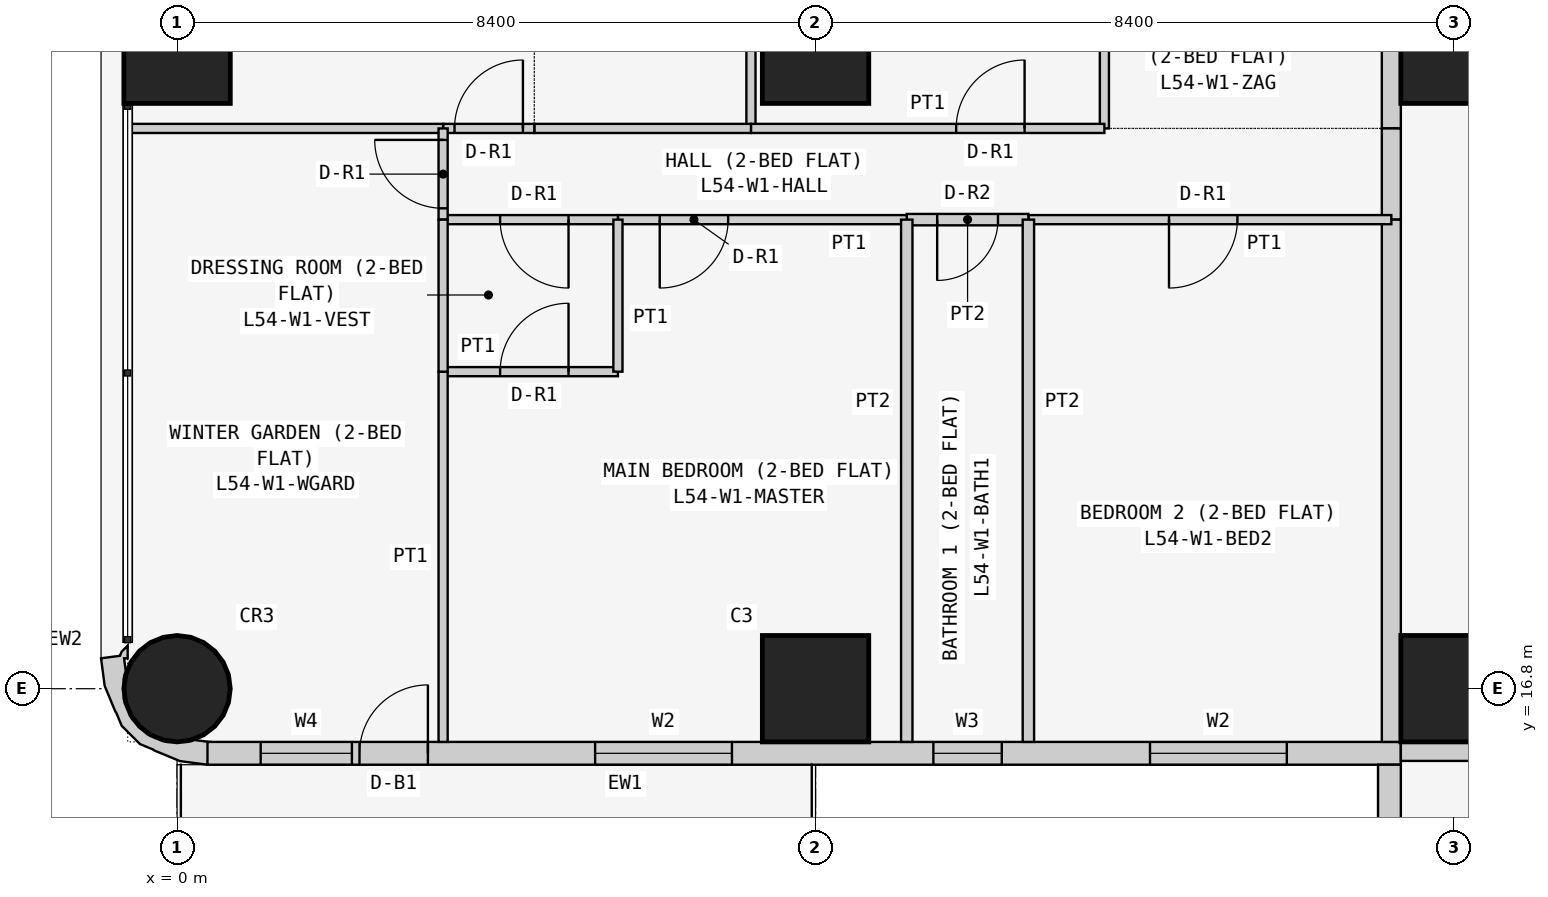
"""IFC4 building model, lengths in metres.
Left out: names, types, materials, properties, quantities, classifications, styles, units other than length and angle.
Written with IfcOpenShell. Run it as: python <this file> out.ifc"""

import sys

from ifc_helpers import new_model, si_unit, direction, frame, frame_2d, origin, origin_2d, place, context, subcontext, project, spatial, polyline, rectangle, circle, outline, extrude, element, fill, save


model = new_model("IFC4")
c1 = context("Model", 3, precision=1e-05, world=origin(), true_north=direction((0.0, 1.0)))
c2 = subcontext(c1, "Body", "Model", "MODEL_VIEW")
j1 = project(units=[si_unit("LENGTHUNIT", "METRE"), si_unit("PLANEANGLEUNIT", "RADIAN")], contexts=[c1])
p1 = place(None, origin())
s1 = spatial("IfcSite", under=j1, at=p1, CompositionType="ELEMENT")
p2 = place(p1, origin())
s2 = spatial("IfcBuilding", under=s1, at=p2, CompositionType="ELEMENT")
p3 = place(p2, frame((0.0, 0.0, 208.5)))
s3 = spatial("IfcBuildingStorey", under=s2, at=p3, CompositionType="ELEMENT", Elevation=208.5)
p4 = place(p3, frame((0.0, 16.8, 0.0), z_axis=(0.0, 0.0, 1.0), x_axis=(1.0, 0.0, 0.0)))
e1 = element("IfcColumn", 1, at=p4, inside=s3, PredefinedType="COLUMN", context=c2, shape_type="SweptSolid", body=[
    extrude(circle(Radius=0.7, at=origin_2d()), origin(), (0.0, 0.0, 1.0), 3.6),
])
for number, where, z_axis, x_axis in (
    (2, (0.0, 25.2, 0.0), (0.0, 0.0, 1.0), (1.0, 0.0, 0.0)),
    (3, (8.4, 16.8, 0.0), (0.0, 0.0, 1.0), (1.0, 0.0, 0.0)),
    (4, (8.4, 25.2, 0.0), (0.0, 0.0, 1.0), (1.0, 0.0, 0.0)),
    (5, (16.8, 16.8, 0.0), (0.0, 0.0, 1.0), (1.0, 0.0, 0.0)),
    (6, (16.8, 25.2, 0.0), (0.0, 0.0, 1.0), (1.0, 0.0, 0.0)),
):
    element("IfcColumn", number, at=place(p3, frame(where, z_axis=z_axis, x_axis=x_axis)), inside=s3, PredefinedType="COLUMN", context=c2, shape_type="SweptSolid", body=[
        extrude(rectangle(XDim=1.4, YDim=1.4, at=origin_2d()), origin(), (0.0, 0.0, 1.0), 3.6),
    ])
p5 = place(p3, frame((0.4, 15.95, 0.0), z_axis=(0.0, 0.0, 1.0), x_axis=(1.0, 0.0, 0.0)))
e7 = element("IfcWall", 7, at=p5, inside=s3, PredefinedType="SOLIDWALL", context=c2, shape_type="SweptSolid", body=[
    extrude(rectangle(XDim=15.7, YDim=0.3, at=frame_2d((7.85, 0.0))), origin(), (0.0, 0.0, 1.0), 3.45),
])
p6 = place(p5, frame((12.4, 0.0, 0.9)))
e8 = element("IfcOpeningElement", 8, at=p6, cuts=e7, PredefinedType="OPENING", context=c2, shape_type="SweptSolid", body=[
    extrude(rectangle(XDim=1.8, YDim=1.5, at=frame_2d((0.9, 0.75))), frame((0.0, 0.16, 0.0), z_axis=(0.0, -1.0, 0.0), x_axis=(1.0, 0.0, 0.0)), (0.0, 0.0, 1.0), 0.32),
])
p7 = place(p5, frame((9.55, 0.0, 1.5)))
e9 = element("IfcOpeningElement", 9, at=p7, cuts=e7, PredefinedType="OPENING", context=c2, shape_type="SweptSolid", body=[
    extrude(rectangle(XDim=0.9, YDim=0.7, at=frame_2d((0.45, 0.35))), frame((0.0, 0.16, 0.0), z_axis=(0.0, -1.0, 0.0), x_axis=(1.0, 0.0, 0.0)), (0.0, 0.0, 1.0), 0.32),
])
p8 = place(p5, frame((5.1, 0.0, 0.9)))
e10 = element("IfcOpeningElement", 10, at=p8, cuts=e7, PredefinedType="OPENING", context=c2, shape_type="SweptSolid", body=[
    extrude(rectangle(XDim=1.8, YDim=1.5, at=frame_2d((0.9, 0.75))), frame((0.0, 0.16, 0.0), z_axis=(0.0, -1.0, 0.0), x_axis=(1.0, 0.0, 0.0)), (0.0, 0.0, 1.0), 0.32),
])
p9 = place(p5, frame((2.0, 0.0, 0.0)))
e11 = element("IfcOpeningElement", 11, at=p9, cuts=e7, PredefinedType="OPENING", context=c2, shape_type="SweptSolid", body=[
    extrude(rectangle(XDim=0.9, YDim=2.4, at=frame_2d((0.45, 1.2))), frame((0.0, 0.16, 0.0), z_axis=(0.0, -1.0, 0.0), x_axis=(1.0, 0.0, 0.0)), (0.0, 0.0, 1.0), 0.32),
])
p10 = place(p5, frame((0.7, 0.0, 0.9)))
e12 = element("IfcOpeningElement", 12, at=p10, cuts=e7, PredefinedType="OPENING", context=c2, shape_type="SweptSolid", body=[
    extrude(rectangle(XDim=1.2, YDim=1.5, at=frame_2d((0.6, 0.75))), frame((0.0, 0.16, 0.0), z_axis=(0.0, -1.0, 0.0), x_axis=(1.0, 0.0, 0.0)), (0.0, 0.0, 1.0), 0.32),
])
p11 = place(p3, frame((15.95, 15.8, 0.0), z_axis=(0.0, 0.0, 1.0), x_axis=(0.0, -1.0, 0.0)))
e13 = element("IfcWall", 13, at=p11, inside=s3, PredefinedType="SOLIDWALL", context=c2, shape_type="SweptSolid", body=[
    extrude(rectangle(XDim=7.0, YDim=0.3, at=frame_2d((3.5, 0.0))), origin(), (0.0, 0.0, 1.0), 3.45),
])
p12 = place(p11, frame((1.5, 0.0, 0.9)))
e14 = element("IfcOpeningElement", 14, at=p12, cuts=e13, PredefinedType="OPENING", context=c2, shape_type="SweptSolid", body=[
    extrude(rectangle(XDim=2.4, YDim=1.5, at=frame_2d((1.2, 0.75))), frame((0.0, 0.16, 0.0), z_axis=(0.0, -1.0, 0.0), x_axis=(1.0, 0.0, 0.0)), (0.0, 0.0, 1.0), 0.32),
])
p13 = place(p11, frame((5.05, 0.0, 0.9)))
e15 = element("IfcOpeningElement", 15, at=p13, cuts=e13, PredefinedType="OPENING", context=c2, shape_type="SweptSolid", body=[
    extrude(rectangle(XDim=1.2, YDim=1.5, at=frame_2d((0.6, 0.75))), frame((0.0, 0.16, 0.0), z_axis=(0.0, -1.0, 0.0), x_axis=(1.0, 0.0, 0.0)), (0.0, 0.0, 1.0), 0.32),
])
p14 = place(p3, frame((-0.588, 17.312, 0.0), z_axis=(0.0, 0.0, 1.0), x_axis=(-0.898030234854, -0.439933741929, 0.0)))
e16 = element("IfcWall", 16, at=p14, inside=s3, PredefinedType="SOLIDWALL", context=c2, shape_type="SweptSolid", body=[
    extrude(outline(polyline([(-0.222, 1.793), (-0.39, 1.541), (-0.372, 1.532), (-0.195, 1.415), (-0.12, 1.41), (0.131, 1.287), (0.315, 1.078), (0.406, 0.814), (0.388, 0.536), (0.265, 0.285), (0.209, 0.236), (0.148, 0.053), (0.105, 0.074), (0.032, -0.076), (0.138, -0.039), (0.182, -0.0), (0.419, -0.08), (0.536, 0.266), (0.559, 0.631), (0.555, 0.651), (0.566, 0.836), (0.456, 1.159), (0.333, 1.298), (0.324, 1.316), (0.082, 1.591), (-0.222, 1.793)])), origin(), (0.0, 0.0, 1.0), 3.45),
])
p15 = place(p3, frame((22.971, 15.975, 0.0), z_axis=(0.0, 0.0, 1.0), x_axis=(-1.0, 0.0, 0.0)))
e17 = element("IfcWall", 17, at=p15, inside=s3, PredefinedType="PARTITIONING", context=c2, shape_type="SweptSolid", body=[
    extrude(rectangle(XDim=6.871, YDim=0.25, at=frame_2d((3.436, 0.0))), origin(), (0.0, 0.0, 1.0), 3.45),
])
p16 = place(p3, frame((15.975, 24.171, 0.0), z_axis=(0.0, 0.0, 1.0), x_axis=(0.0, 1.0, 0.0)))
e18 = element("IfcWall", 18, at=p16, inside=s3, PredefinedType="PARTITIONING", context=c2, shape_type="SweptSolid", body=[
    extrude(rectangle(XDim=5.229, YDim=0.25, at=frame_2d((2.615, 0.0))), origin(), (0.0, 0.0, 1.0), 3.45),
])
p17 = place(p16, frame((2.129, 0.0, 0.0)))
e19 = element("IfcOpeningElement", 19, at=p17, cuts=e18, PredefinedType="OPENING", context=c2, shape_type="SweptSolid", body=[
    extrude(rectangle(XDim=1.0, YDim=2.1, at=frame_2d((0.5, 1.05))), frame((0.0, 0.135, 0.0), z_axis=(0.0, -1.0, 0.0), x_axis=(1.0, 0.0, 0.0)), (0.0, 0.0, 1.0), 0.27),
])
p18 = place(p3, frame((15.975, 22.971, 0.0), z_axis=(0.0, 0.0, 1.0), x_axis=(0.0, 1.0, 0.0)))
e20 = element("IfcWall", 20, at=p18, inside=s3, PredefinedType="PARTITIONING", context=c2, shape_type="SweptSolid", body=[
    extrude(rectangle(XDim=1.2, YDim=0.25, at=frame_2d((0.6, 0.0))), origin(), (0.0, 0.0, 1.0), 3.45),
])
p19 = place(p3, frame((15.975, 16.1, 0.0), z_axis=(0.0, 0.0, 1.0), x_axis=(0.0, 1.0, 0.0)))
e21 = element("IfcWall", 21, at=p19, inside=s3, PredefinedType="PARTITIONING", context=c2, shape_type="SweptSolid", body=[
    extrude(rectangle(XDim=6.871, YDim=0.25, at=frame_2d((3.436, 0.0))), origin(), (0.0, 0.0, 1.0), 3.45),
])
for number, where, z_axis, x_axis in (
    (22, (12.2, 29.4, 0.0), (0.0, 0.0, 1.0), (0.0, -1.0, 0.0)),
    (23, (7.55, 29.4, 0.0), (0.0, 0.0, 1.0), (0.0, -1.0, 0.0)),
):
    element("IfcWall", number, at=place(p3, frame(where, z_axis=z_axis, x_axis=x_axis)), inside=s3, PredefinedType="PARTITIONING", context=c2, shape_type="SweptSolid", body=[
        extrude(rectangle(XDim=5.229, YDim=0.12, at=frame_2d((2.615, 0.0))), origin(), (0.0, 0.0, 1.0), 3.45),
    ])
p20 = place(p3, frame((7.55, 24.171, 0.0), z_axis=(0.0, 0.0, 1.0), x_axis=(1.0, 0.0, 0.0)))
e24 = element("IfcWall", 24, at=p20, inside=s3, PredefinedType="PARTITIONING", context=c2, shape_type="SweptSolid", body=[
    extrude(rectangle(XDim=4.65, YDim=0.12, at=frame_2d((2.325, 0.0))), origin(), (0.0, 0.0, 1.0), 3.45),
])
p21 = place(p20, frame((2.7, 0.0, 0.0)))
e25 = element("IfcOpeningElement", 25, at=p21, cuts=e24, PredefinedType="OPENING", context=c2, shape_type="SweptSolid", body=[
    extrude(rectangle(XDim=0.9, YDim=2.1, at=frame_2d((0.45, 1.05))), frame((0.0, 0.07, 0.0), z_axis=(0.0, -1.0, 0.0), x_axis=(1.0, 0.0, 0.0)), (0.0, 0.0, 1.0), 0.14),
])
p22 = place(p3, frame((4.7, 24.171, 0.0), z_axis=(0.0, 0.0, 1.0), x_axis=(1.0, 0.0, 0.0)))
e26 = element("IfcWall", 26, at=p22, inside=s3, PredefinedType="PARTITIONING", context=c2, shape_type="SweptSolid", body=[
    extrude(rectangle(XDim=2.85, YDim=0.12, at=frame_2d((1.425, 0.0))), origin(), (0.0, 0.0, 1.0), 3.45),
])
p23 = place(p3, frame((3.5, 24.171, 0.0), z_axis=(0.0, 0.0, 1.0), x_axis=(1.0, 0.0, 0.0)))
e27 = element("IfcWall", 27, at=p23, inside=s3, PredefinedType="PARTITIONING", context=c2, shape_type="SweptSolid", body=[
    extrude(rectangle(XDim=1.2, YDim=0.12, at=frame_2d((0.6, 0.0))), origin(), (0.0, 0.0, 1.0), 3.45),
])
p24 = place(p23, frame((0.15, 0.0, 0.0)))
e28 = element("IfcOpeningElement", 28, at=p24, cuts=e27, PredefinedType="OPENING", context=c2, shape_type="SweptSolid", body=[
    extrude(rectangle(XDim=0.9, YDim=2.1, at=frame_2d((0.45, 1.05))), frame((0.0, 0.07, 0.0), z_axis=(0.0, -1.0, 0.0), x_axis=(1.0, 0.0, 0.0)), (0.0, 0.0, 1.0), 0.14),
])
p25 = place(p3, frame((-0.65, 24.171, 0.0), z_axis=(0.0, 0.0, 1.0), x_axis=(1.0, 0.0, 0.0)))
e29 = element("IfcWall", 29, at=p25, inside=s3, PredefinedType="PARTITIONING", context=c2, shape_type="SweptSolid", body=[
    extrude(rectangle(XDim=4.15, YDim=0.12, at=frame_2d((2.075, 0.0))), origin(), (0.0, 0.0, 1.0), 3.45),
])
p26 = place(p3, frame((11.2, 22.971, 0.0), z_axis=(0.0, 0.0, 1.0), x_axis=(1.0, 0.0, 0.0)))
e30 = element("IfcWall", 30, at=p26, inside=s3, PredefinedType="PARTITIONING", context=c2, shape_type="SweptSolid", body=[
    extrude(rectangle(XDim=4.775, YDim=0.12, at=frame_2d((2.388, 0.0))), origin(), (0.0, 0.0, 1.0), 3.45),
])
p27 = place(p26, frame((1.85, 0.0, 0.0)))
e31 = element("IfcOpeningElement", 31, at=p27, cuts=e30, PredefinedType="OPENING", context=c2, shape_type="SweptSolid", body=[
    extrude(rectangle(XDim=0.9, YDim=2.1, at=frame_2d((0.45, 1.05))), frame((0.0, 0.07, 0.0), z_axis=(0.0, -1.0, 0.0), x_axis=(1.0, 0.0, 0.0)), (0.0, 0.0, 1.0), 0.14),
])
p28 = place(p3, frame((9.6, 22.971, 0.0), z_axis=(0.0, 0.0, 1.0), x_axis=(1.0, 0.0, 0.0)))
e32 = element("IfcWall", 32, at=p28, inside=s3, PredefinedType="PARTITIONING", context=c2, shape_type="SweptSolid", body=[
    extrude(rectangle(XDim=1.6, YDim=0.15, at=frame_2d((0.8, 0.0))), origin(), (0.0, 0.0, 1.0), 3.45),
])
p29 = place(p28, frame((0.4, 0.0, 0.0)))
e33 = element("IfcOpeningElement", 33, at=p29, cuts=e32, PredefinedType="OPENING", context=c2, shape_type="SweptSolid", body=[
    extrude(rectangle(XDim=0.8, YDim=2.1, at=frame_2d((0.4, 1.05))), frame((0.0, 0.085, 0.0), z_axis=(0.0, -1.0, 0.0), x_axis=(1.0, 0.0, 0.0)), (0.0, 0.0, 1.0), 0.17),
])
p30 = place(p3, frame((5.8, 22.971, 0.0), z_axis=(0.0, 0.0, 1.0), x_axis=(1.0, 0.0, 0.0)))
e34 = element("IfcWall", 34, at=p30, inside=s3, PredefinedType="PARTITIONING", context=c2, shape_type="SweptSolid", body=[
    extrude(rectangle(XDim=3.8, YDim=0.12, at=frame_2d((1.9, 0.0))), origin(), (0.0, 0.0, 1.0), 3.45),
])
p31 = place(p30, frame((0.55, 0.0, 0.0)))
e35 = element("IfcOpeningElement", 35, at=p31, cuts=e34, PredefinedType="OPENING", context=c2, shape_type="SweptSolid", body=[
    extrude(rectangle(XDim=0.9, YDim=2.1, at=frame_2d((0.45, 1.05))), frame((0.0, 0.07, 0.0), z_axis=(0.0, -1.0, 0.0), x_axis=(1.0, 0.0, 0.0)), (0.0, 0.0, 1.0), 0.14),
])
p32 = place(p3, frame((3.5, 22.971, 0.0), z_axis=(0.0, 0.0, 1.0), x_axis=(1.0, 0.0, 0.0)))
e36 = element("IfcWall", 36, at=p32, inside=s3, PredefinedType="PARTITIONING", context=c2, shape_type="SweptSolid", body=[
    extrude(rectangle(XDim=2.3, YDim=0.12, at=frame_2d((1.15, 0.0))), origin(), (0.0, 0.0, 1.0), 3.45),
])
p33 = place(p32, frame((0.75, 0.0, 0.0)))
e37 = element("IfcOpeningElement", 37, at=p33, cuts=e36, PredefinedType="OPENING", context=c2, shape_type="SweptSolid", body=[
    extrude(rectangle(XDim=0.9, YDim=2.1, at=frame_2d((0.45, 1.05))), frame((0.0, 0.07, 0.0), z_axis=(0.0, -1.0, 0.0), x_axis=(1.0, 0.0, 0.0)), (0.0, 0.0, 1.0), 0.14),
])
p34 = place(p3, frame((3.5, 24.171, 0.0), z_axis=(0.0, 0.0, 1.0), x_axis=(0.0, -1.0, 0.0)))
e38 = element("IfcWall", 38, at=p34, inside=s3, PredefinedType="PARTITIONING", context=c2, shape_type="SweptSolid", body=[
    extrude(rectangle(XDim=1.2, YDim=0.12, at=frame_2d((0.6, 0.0))), origin(), (0.0, 0.0, 1.0), 3.45),
])
p35 = place(p34, frame((0.151, 0.0, 0.0)))
e39 = element("IfcOpeningElement", 39, at=p35, cuts=e38, PredefinedType="OPENING", context=c2, shape_type="SweptSolid", body=[
    extrude(rectangle(XDim=0.9, YDim=2.1, at=frame_2d((0.45, 1.05))), frame((0.0, 0.07, 0.0), z_axis=(0.0, -1.0, 0.0), x_axis=(1.0, 0.0, 0.0)), (0.0, 0.0, 1.0), 0.14),
])
for number, where, z_axis, x_axis in (
    (40, (11.2, 22.971, 0.0), (0.0, 0.0, 1.0), (0.0, -1.0, 0.0)),
    (41, (9.6, 22.971, 0.0), (0.0, 0.0, 1.0), (0.0, -1.0, 0.0)),
):
    element("IfcWall", number, at=place(p3, frame(where, z_axis=z_axis, x_axis=x_axis)), inside=s3, PredefinedType="PARTITIONING", context=c2, shape_type="SweptSolid", body=[
        extrude(rectangle(XDim=6.871, YDim=0.15, at=frame_2d((3.436, 0.0))), origin(), (0.0, 0.0, 1.0), 3.45),
    ])
p36 = place(p3, frame((3.5, 20.971, 0.0), z_axis=(0.0, 0.0, 1.0), x_axis=(1.0, 0.0, 0.0)))
e42 = element("IfcWall", 42, at=p36, inside=s3, PredefinedType="PARTITIONING", context=c2, shape_type="SweptSolid", body=[
    extrude(rectangle(XDim=2.3, YDim=0.12, at=frame_2d((1.15, 0.0))), origin(), (0.0, 0.0, 1.0), 3.45),
])
p37 = place(p36, frame((0.75, 0.0, 0.0)))
e43 = element("IfcOpeningElement", 43, at=p37, cuts=e42, PredefinedType="OPENING", context=c2, shape_type="SweptSolid", body=[
    extrude(rectangle(XDim=0.9, YDim=2.1, at=frame_2d((0.45, 1.05))), frame((0.0, 0.07, 0.0), z_axis=(0.0, -1.0, 0.0), x_axis=(1.0, 0.0, 0.0)), (0.0, 0.0, 1.0), 0.14),
])
p38 = place(p3, frame((5.8, 20.971, 0.0), z_axis=(0.0, 0.0, 1.0), x_axis=(0.0, 1.0, 0.0)))
e44 = element("IfcWall", 44, at=p38, inside=s3, PredefinedType="PARTITIONING", context=c2, shape_type="SweptSolid", body=[
    extrude(rectangle(XDim=2.0, YDim=0.12, at=frame_2d((1.0, 0.0))), origin(), (0.0, 0.0, 1.0), 3.45),
])
p39 = place(p3, frame((3.5, 16.1, 0.0), z_axis=(0.0, 0.0, 1.0), x_axis=(0.0, 1.0, 0.0)))
e45 = element("IfcWall", 45, at=p39, inside=s3, PredefinedType="PARTITIONING", context=c2, shape_type="SweptSolid", body=[
    extrude(rectangle(XDim=4.871, YDim=0.12, at=frame_2d((2.436, 0.0))), origin(), (0.0, 0.0, 1.0), 3.45),
])
p40 = place(p3, frame((3.5, 22.971, 0.0), z_axis=(0.0, 0.0, 1.0), x_axis=(0.0, -1.0, 0.0)))
e46 = element("IfcWall", 46, at=p40, inside=s3, PredefinedType="PARTITIONING", context=c2, shape_type="SweptSolid", body=[
    extrude(rectangle(XDim=2.0, YDim=0.12, at=frame_2d((1.0, 0.0))), origin(), (0.0, 0.0, 1.0), 3.45),
])
p41 = place(p6, origin())
e47 = element("IfcWindow", 47, at=p41, inside=s3, PartitioningType="SINGLE_PANEL", PredefinedType="WINDOW", context=c2, shape_type="SweptSolid", body=[
    extrude(rectangle(XDim=1.8, YDim=1.5, at=frame_2d((0.9, 0.75))), frame((0.0, 0.03, 0.0), z_axis=(0.0, -1.0, 0.0), x_axis=(1.0, 0.0, 0.0)), (0.0, 0.0, 1.0), 0.06),
])
fill(e8, e47)
p42 = place(p7, origin())
e48 = element("IfcWindow", 48, at=p42, inside=s3, PartitioningType="SINGLE_PANEL", PredefinedType="WINDOW", context=c2, shape_type="SweptSolid", body=[
    extrude(rectangle(XDim=0.9, YDim=0.7, at=frame_2d((0.45, 0.35))), frame((0.0, 0.03, 0.0), z_axis=(0.0, -1.0, 0.0), x_axis=(1.0, 0.0, 0.0)), (0.0, 0.0, 1.0), 0.06),
])
fill(e9, e48)
p43 = place(p8, origin())
e49 = element("IfcWindow", 49, at=p43, inside=s3, PartitioningType="SINGLE_PANEL", PredefinedType="WINDOW", context=c2, shape_type="SweptSolid", body=[
    extrude(rectangle(XDim=1.8, YDim=1.5, at=frame_2d((0.9, 0.75))), frame((0.0, 0.03, 0.0), z_axis=(0.0, -1.0, 0.0), x_axis=(1.0, 0.0, 0.0)), (0.0, 0.0, 1.0), 0.06),
])
fill(e10, e49)
p44 = place(p9, origin())
e50 = element("IfcDoor", 50, at=p44, inside=s3, OperationType="SINGLE_SWING_RIGHT", PredefinedType="DOOR", context=c2, shape_type="SweptSolid", body=[
    extrude(rectangle(XDim=0.9, YDim=2.4, at=frame_2d((0.45, 1.2))), frame((0.0, 0.025, 0.0), z_axis=(0.0, -1.0, 0.0), x_axis=(1.0, 0.0, 0.0)), (0.0, 0.0, 1.0), 0.05),
])
fill(e11, e50)
p45 = place(p10, origin())
e51 = element("IfcWindow", 51, at=p45, inside=s3, PartitioningType="SINGLE_PANEL", PredefinedType="WINDOW", context=c2, shape_type="SweptSolid", body=[
    extrude(rectangle(XDim=1.2, YDim=1.5, at=frame_2d((0.6, 0.75))), frame((0.0, 0.03, 0.0), z_axis=(0.0, -1.0, 0.0), x_axis=(1.0, 0.0, 0.0)), (0.0, 0.0, 1.0), 0.06),
])
fill(e12, e51)
p46 = place(p21, origin())
e52 = element("IfcDoor", 52, at=p46, inside=s3, OperationType="SINGLE_SWING_RIGHT", PredefinedType="DOOR", context=c2, shape_type="SweptSolid", body=[
    extrude(rectangle(XDim=0.9, YDim=2.1, at=frame_2d((0.45, 1.05))), frame((0.0, 0.025, 0.0), z_axis=(0.0, -1.0, 0.0), x_axis=(1.0, 0.0, 0.0)), (0.0, 0.0, 1.0), 0.05),
])
fill(e25, e52)
p47 = place(p24, origin())
e53 = element("IfcDoor", 53, at=p47, inside=s3, OperationType="SINGLE_SWING_RIGHT", PredefinedType="DOOR", context=c2, shape_type="SweptSolid", body=[
    extrude(rectangle(XDim=0.9, YDim=2.1, at=frame_2d((0.45, 1.05))), frame((0.0, 0.025, 0.0), z_axis=(0.0, -1.0, 0.0), x_axis=(1.0, 0.0, 0.0)), (0.0, 0.0, 1.0), 0.05),
])
fill(e28, e53)
p48 = place(p27, frame((0.9, 0.0, 0.0), z_axis=(0.0, 0.0, 1.0), x_axis=(-1.0, 0.0, 0.0)))
e54 = element("IfcDoor", 54, at=p48, inside=s3, OperationType="SINGLE_SWING_RIGHT", PredefinedType="DOOR", context=c2, shape_type="SweptSolid", body=[
    extrude(rectangle(XDim=0.9, YDim=2.1, at=frame_2d((0.45, 1.05))), frame((0.0, 0.025, 0.0), z_axis=(0.0, -1.0, 0.0), x_axis=(1.0, 0.0, 0.0)), (0.0, 0.0, 1.0), 0.05),
])
fill(e31, e54)
p49 = place(p29, frame((0.8, 0.0, 0.0), z_axis=(0.0, 0.0, 1.0), x_axis=(-1.0, 0.0, 0.0)))
e55 = element("IfcDoor", 55, at=p49, inside=s3, OperationType="SINGLE_SWING_RIGHT", PredefinedType="DOOR", context=c2, shape_type="SweptSolid", body=[
    extrude(rectangle(XDim=0.8, YDim=2.1, at=frame_2d((0.4, 1.05))), frame((0.0, 0.025, 0.0), z_axis=(0.0, -1.0, 0.0), x_axis=(1.0, 0.0, 0.0)), (0.0, 0.0, 1.0), 0.05),
])
fill(e33, e55)
p50 = place(p31, frame((0.9, 0.0, 0.0), z_axis=(0.0, 0.0, 1.0), x_axis=(-1.0, 0.0, 0.0)))
e56 = element("IfcDoor", 56, at=p50, inside=s3, OperationType="SINGLE_SWING_RIGHT", PredefinedType="DOOR", context=c2, shape_type="SweptSolid", body=[
    extrude(rectangle(XDim=0.9, YDim=2.1, at=frame_2d((0.45, 1.05))), frame((0.0, 0.025, 0.0), z_axis=(0.0, -1.0, 0.0), x_axis=(1.0, 0.0, 0.0)), (0.0, 0.0, 1.0), 0.05),
])
fill(e35, e56)
p51 = place(p33, frame((0.9, 0.0, 0.0), z_axis=(0.0, 0.0, 1.0), x_axis=(-1.0, 0.0, 0.0)))
e57 = element("IfcDoor", 57, at=p51, inside=s3, OperationType="SINGLE_SWING_LEFT", PredefinedType="DOOR", context=c2, shape_type="SweptSolid", body=[
    extrude(rectangle(XDim=0.9, YDim=2.1, at=frame_2d((0.45, 1.05))), frame((0.0, 0.025, 0.0), z_axis=(0.0, -1.0, 0.0), x_axis=(1.0, 0.0, 0.0)), (0.0, 0.0, 1.0), 0.05),
])
fill(e37, e57)
p52 = place(p37, origin())
e58 = element("IfcDoor", 58, at=p52, inside=s3, OperationType="SINGLE_SWING_RIGHT", PredefinedType="DOOR", context=c2, shape_type="SweptSolid", body=[
    extrude(rectangle(XDim=0.9, YDim=2.1, at=frame_2d((0.45, 1.05))), frame((0.0, 0.025, 0.0), z_axis=(0.0, -1.0, 0.0), x_axis=(1.0, 0.0, 0.0)), (0.0, 0.0, 1.0), 0.05),
])
fill(e43, e58)
p53 = place(p35, frame((0.9, 0.0, 0.0), z_axis=(0.0, 0.0, 1.0), x_axis=(-1.0, 0.0, 0.0)))
e59 = element("IfcDoor", 59, at=p53, inside=s3, OperationType="SINGLE_SWING_RIGHT", PredefinedType="DOOR", context=c2, shape_type="SweptSolid", body=[
    extrude(rectangle(XDim=0.9, YDim=2.1, at=frame_2d((0.45, 1.05))), frame((0.0, 0.025, 0.0), z_axis=(0.0, -1.0, 0.0), x_axis=(1.0, 0.0, 0.0)), (0.0, 0.0, 1.0), 0.05),
])
fill(e39, e59)
save(model, sys.argv[1])
